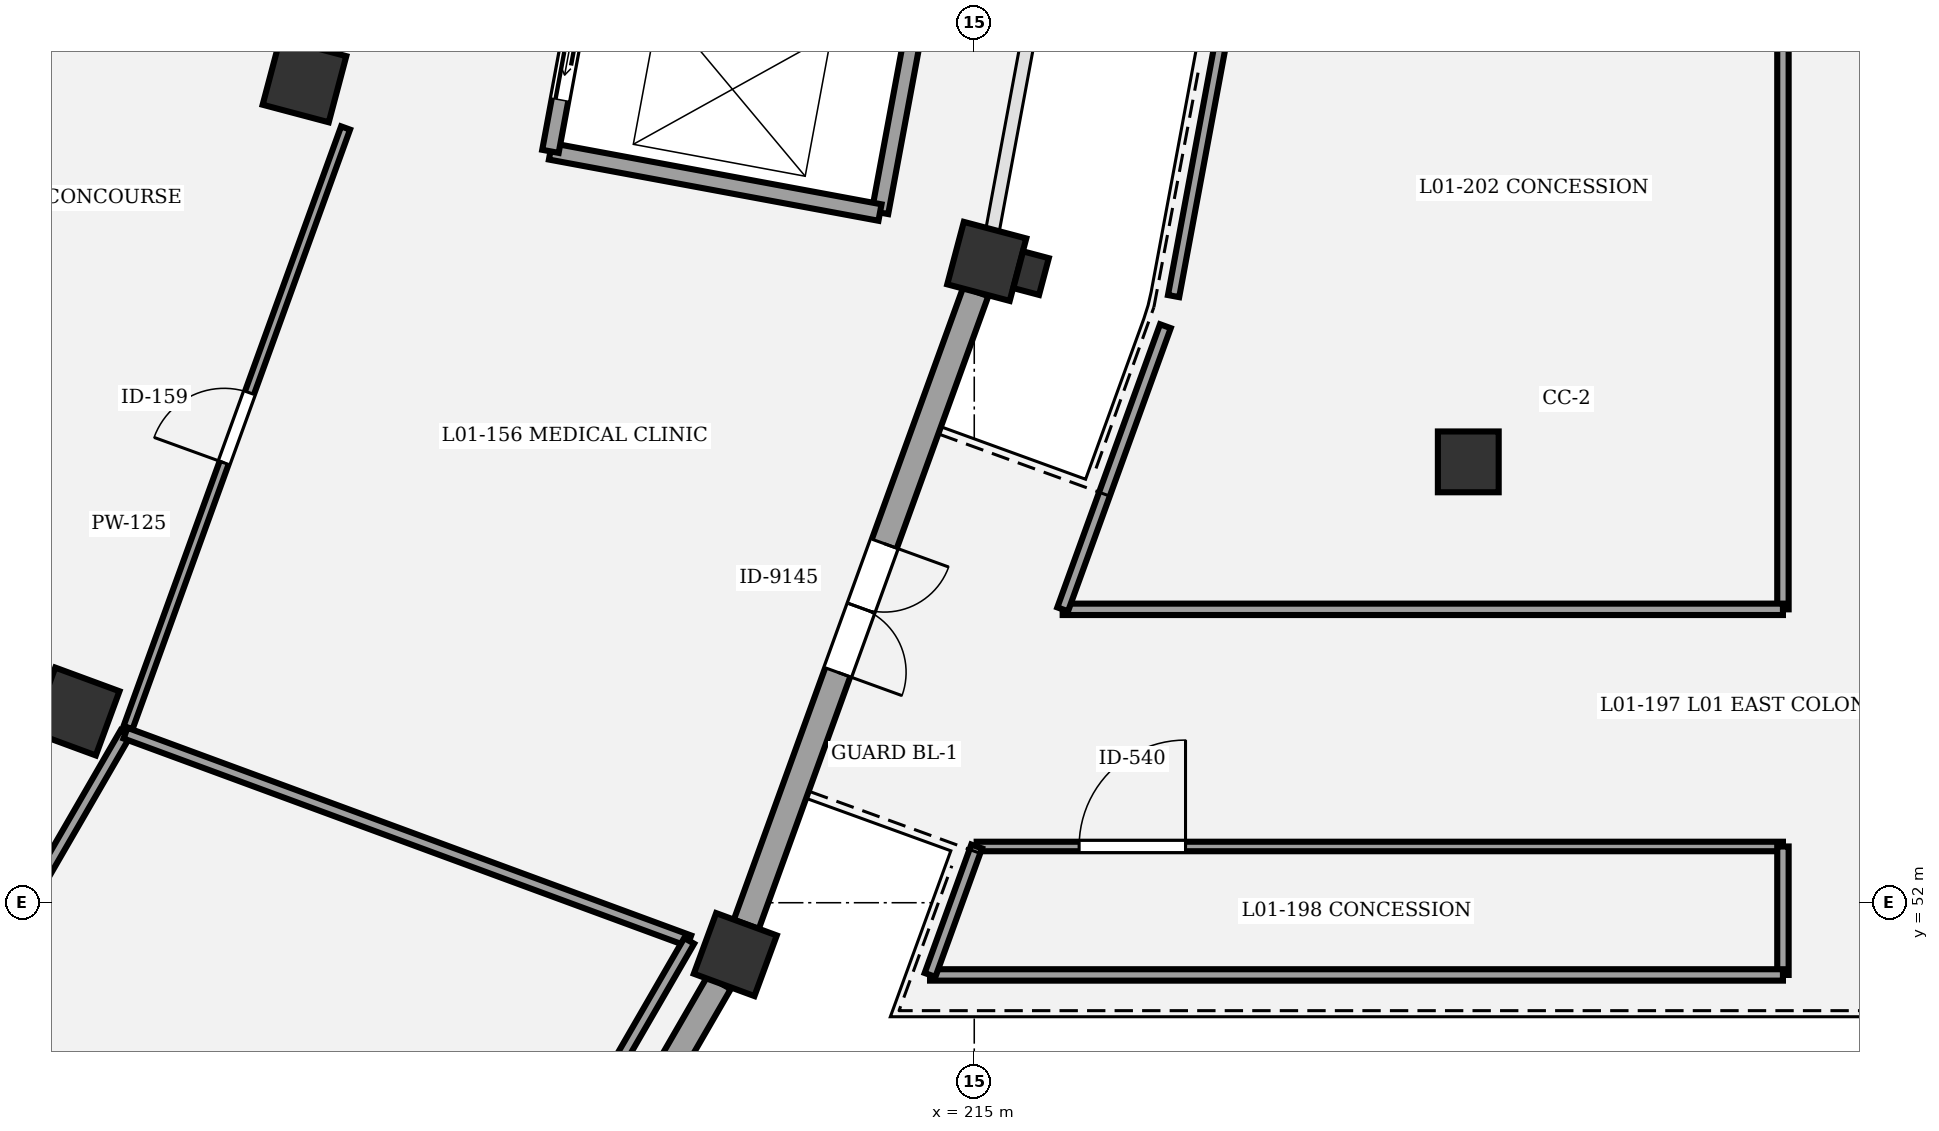
"""IFC4 building model, lengths in metres.
Left out: names, types, materials, properties, quantities, classifications, styles, units other than length and angle.
Written with IfcOpenShell. Run it as: python <this file> out.ifc"""

import sys

from ifc_helpers import new_model, si_unit, direction, frame, frame_2d, origin, origin_2d, place, context, subcontext, project, spatial, rectangle, circle, extrude, element, fill, save


model = new_model("IFC4")
c1 = context("Model", 3, precision=1e-05, world=origin(), true_north=direction((0.0, 1.0)))
c2 = subcontext(c1, "Body", "Model", "MODEL_VIEW")
j1 = project(units=[si_unit("LENGTHUNIT", "METRE"), si_unit("PLANEANGLEUNIT", "RADIAN")], contexts=[c1])
p1 = place(None, origin())
s1 = spatial("IfcSite", under=j1, at=p1, CompositionType="ELEMENT")
p2 = place(p1, origin())
s2 = spatial("IfcBuilding", under=s1, at=p2, CompositionType="ELEMENT")
p3 = place(p2, frame((0.0, 0.0, 5.4)))
s3 = spatial("IfcBuildingStorey", under=s2, at=p3, CompositionType="ELEMENT", Elevation=5.4)
p4 = place(p3, frame((203.176, 54.516, 0.0), z_axis=(0.0, 0.0, 1.0), x_axis=(0.938372433776, -0.34562577382, 0.0)))
e1 = element("IfcColumn", 1, at=p4, inside=s3, PredefinedType="COLUMN", context=c2, shape_type="SweptSolid", body=[
    extrude(rectangle(XDim=0.9, YDim=0.9, at=origin_2d()), origin(), (0.0, 0.0, 1.0), 4.8),
])
p5 = place(p3, frame((211.856, 51.318, 0.0), z_axis=(0.0, 0.0, 1.0), x_axis=(0.938372433776, -0.34562577382, 0.0)))
e2 = element("IfcColumn", 2, at=p5, inside=s3, PredefinedType="COLUMN", context=c2, shape_type="SweptSolid", body=[
    extrude(rectangle(XDim=0.85, YDim=0.85, at=origin_2d()), origin(), (0.0, 0.0, 1.0), 4.8),
])
p6 = place(p3, frame((206.188, 62.818, 0.0), z_axis=(0.0, 0.0, 1.0), x_axis=(0.966600102017, -0.256289373133, 0.0)))
e3 = element("IfcColumn", 3, at=p6, inside=s3, PredefinedType="COLUMN", context=c2, shape_type="SweptSolid", body=[
    extrude(rectangle(XDim=0.9, YDim=0.9, at=origin_2d()), origin(), (0.0, 0.0, 1.0), 4.8),
])
p7 = place(p3, frame((215.165, 60.438, 0.0), z_axis=(0.0, 0.0, 1.0), x_axis=(0.966600102017, -0.256289373133, 0.0)))
e4 = element("IfcColumn", 4, at=p7, inside=s3, PredefinedType="COLUMN", context=c2, shape_type="SweptSolid", body=[
    extrude(rectangle(XDim=0.85, YDim=0.85, at=origin_2d()), origin(), (0.0, 0.0, 1.0), 4.8),
])
p8 = place(p3, frame((215.748, 60.283, 0.0), z_axis=(0.0, 0.0, 1.0), x_axis=(0.256289373133, 0.966600102017, 0.0)))
e5 = element("IfcColumn", 5, at=p8, inside=s3, PredefinedType="PILASTER", context=c2, shape_type="SweptSolid", body=[
    extrude(rectangle(XDim=0.5, YDim=0.35, at=origin_2d()), origin(), (0.0, 0.0, 1.0), 4.8),
])
p9 = place(p3, frame((221.5, 57.8, 0.0), z_axis=(0.0, 0.0, 1.0), x_axis=(1.0, 0.0, 0.0)))
e6 = element("IfcColumn", 6, at=p9, inside=s3, PredefinedType="COLUMN", context=c2, shape_type="SweptSolid", body=[
    extrude(circle(Radius=0.4, at=origin_2d()), origin(), (0.0, 0.0, 1.0), 4.8),
])
p10 = place(p3, frame((207.454, 43.705, 0.0), z_axis=(0.0, 0.0, 1.0), x_axis=(0.500557937356, 0.865703038778, 0.0)))
e7 = element("IfcWall", 7, at=p10, inside=s3, PredefinedType="STANDARD", context=c2, shape_type="SweptSolid", body=[
    extrude(rectangle(XDim=8.371, YDim=0.35, at=frame_2d((4.186, 0.0))), origin(), (0.0, 0.0, 1.0), 3.57),
])
p11 = place(p10, frame((3.075, 0.0, 0.9)))
e8 = element("IfcOpeningElement", 8, at=p11, cuts=e7, PredefinedType="OPENING", context=c2, shape_type="SweptSolid", body=[
    extrude(rectangle(XDim=2.22, YDim=1.75, at=frame_2d((1.11, 0.875))), frame((0.0, 0.185, 0.0), z_axis=(0.0, -1.0, 0.0), x_axis=(1.0, 0.0, 0.0)), (0.0, 0.0, 1.0), 0.37),
])
p12 = place(p3, frame((215.02, 60.04, 0.0), z_axis=(0.0, 0.0, 1.0), x_axis=(-0.341014666885, -0.940057975324, 0.0)))
e9 = element("IfcWall", 9, at=p12, inside=s3, PredefinedType="STANDARD", context=c2, shape_type="SweptSolid", body=[
    extrude(rectangle(XDim=8.855, YDim=0.35, at=frame_2d((4.428, 0.0))), origin(), (0.0, 0.0, 1.0), 3.57),
])
p13 = place(p12, frame((3.528, 0.0, 0.0)))
e10 = element("IfcOpeningElement", 10, at=p13, cuts=e9, PredefinedType="OPENING", context=c2, shape_type="SweptSolid", body=[
    extrude(rectangle(XDim=1.8, YDim=2.4, at=frame_2d((0.9, 1.2))), frame((0.0, 0.185, 0.0), z_axis=(0.0, -1.0, 0.0), x_axis=(1.0, 0.0, 0.0)), (0.0, 0.0, 1.0), 0.37),
])
p14 = place(p3, frame((215.772, 71.915, 0.0), z_axis=(0.0, 0.0, 1.0), x_axis=(-0.182574755222, -0.983191974517, 0.0)))
e11 = element("IfcWall", 11, at=p14, inside=s3, PredefinedType="SHEAR", context=c2, shape_type="SweptSolid", body=[
    extrude(rectangle(XDim=11.02, YDim=0.22, at=frame_2d((5.51, 0.0))), origin(), (0.0, 0.0, 1.0), 4.55),
])
p15 = place(p3, frame((209.424, 61.885, 0.0), z_axis=(0.0, 0.0, 1.0), x_axis=(0.983189729951, -0.18258684213, 0.0)))
e12 = element("IfcWall", 12, at=p15, inside=s3, PredefinedType="SHEAR", context=c2, shape_type="SweptSolid", body=[
    extrude(rectangle(XDim=4.41, YDim=0.22, at=frame_2d((2.205, 0.0))), origin(), (0.0, 0.0, 1.0), 4.55),
])
p16 = place(p3, frame((211.436, 72.72, 0.0), z_axis=(0.0, 0.0, 1.0), x_axis=(-0.182570778451, -0.983192712979, 0.0)))
e13 = element("IfcWall", 13, at=p16, inside=s3, PredefinedType="SHEAR", context=c2, shape_type="SweptSolid", body=[
    extrude(rectangle(XDim=11.02, YDim=0.22, at=frame_2d((5.51, 0.0))), origin(), (0.0, 0.0, 1.0), 4.55),
])
p17 = place(p16, frame((0.3, 0.0, 0.0)))
e14 = element("IfcOpeningElement", 14, at=p17, cuts=e13, PredefinedType="OPENING", context=c2, shape_type="SweptSolid", body=[
    extrude(rectangle(XDim=1.15, YDim=2.15, at=frame_2d((0.575, 1.075))), frame((0.0, 0.12, 0.0), z_axis=(0.0, -1.0, 0.0), x_axis=(1.0, 0.0, 0.0)), (0.0, 0.0, 1.0), 0.24),
])
p18 = place(p16, frame((9.23, 0.0, 0.0)))
e15 = element("IfcOpeningElement", 15, at=p18, cuts=e13, PredefinedType="OPENING", context=c2, shape_type="SweptSolid", body=[
    extrude(rectangle(XDim=1.1, YDim=2.15, at=frame_2d((0.55, 1.075))), frame((0.0, 0.12, 0.0), z_axis=(0.0, -1.0, 0.0), x_axis=(1.0, 0.0, 0.0)), (0.0, 0.0, 1.0), 0.24),
])
p19 = place(p3, frame((199.641, 46.981, 0.0), z_axis=(0.0, 0.0, 1.0), x_axis=(0.500559280672, 0.865702262059, 0.0)))
e16 = element("IfcWall", 16, at=p19, inside=s3, PredefinedType="PARTITIONING", context=c2, shape_type="SweptSolid", body=[
    extrude(rectangle(XDim=8.375, YDim=0.15, at=frame_2d((4.187, 0.0))), origin(), (0.0, 0.0, 1.0), 3.55),
])
p20 = place(p19, frame((3.737, 0.0, 0.0)))
e17 = element("IfcOpeningElement", 17, at=p20, cuts=e16, PredefinedType="OPENING", context=c2, shape_type="SweptSolid", body=[
    extrude(rectangle(XDim=0.9, YDim=2.2, at=frame_2d((0.45, 1.1))), frame((0.0, 0.085, 0.0), z_axis=(0.0, -1.0, 0.0), x_axis=(1.0, 0.0, 0.0)), (0.0, 0.0, 1.0), 0.17),
])
p21 = place(p3, frame((203.866, 54.304, 0.0), z_axis=(0.0, 0.0, 1.0), x_axis=(0.341044550343, 0.940047134287, 0.0)))
e18 = element("IfcWall", 18, at=p21, inside=s3, PredefinedType="PARTITIONING", context=c2, shape_type="SweptSolid", body=[
    extrude(rectangle(XDim=8.392, YDim=0.125, at=frame_2d((4.196, 0.0))), origin(), (0.0, 0.0, 1.0), 3.55),
])
p22 = place(p21, frame((3.706, 0.0, 0.0)))
e19 = element("IfcOpeningElement", 19, at=p22, cuts=e18, PredefinedType="OPENING", context=c2, shape_type="SweptSolid", body=[
    extrude(rectangle(XDim=0.98, YDim=2.2, at=frame_2d((0.49, 1.1))), frame((0.0, 0.073, 0.0), z_axis=(0.0, -1.0, 0.0), x_axis=(1.0, 0.0, 0.0)), (0.0, 0.0, 1.0), 0.145),
])
p23 = place(p3, frame((215.031, 52.74, 0.0), z_axis=(0.0, 0.0, 1.0), x_axis=(1.0, 0.0, 0.0)))
e20 = element("IfcWall", 20, at=p23, inside=s3, PredefinedType="PARTITIONING", context=c2, shape_type="SweptSolid", body=[
    extrude(rectangle(XDim=10.608, YDim=0.125, at=frame_2d((5.304, 0.0))), origin(), (0.0, 0.0, 1.0), 3.55),
])
p24 = place(p23, frame((1.348, 0.0, 0.0)))
e21 = element("IfcOpeningElement", 21, at=p24, cuts=e20, PredefinedType="OPENING", context=c2, shape_type="SweptSolid", body=[
    extrude(rectangle(XDim=1.4, YDim=2.3, at=frame_2d((0.7, 1.15))), frame((0.0, 0.073, 0.0), z_axis=(0.0, -1.0, 0.0), x_axis=(1.0, 0.0, 0.0)), (0.0, 0.0, 1.0), 0.145),
])
p25 = place(p3, frame((225.64, 74.55, 0.0), z_axis=(0.0, 0.0, 1.0), x_axis=(0.0, -1.0, 0.0)))
e22 = element("IfcWall", 22, at=p25, inside=s3, PredefinedType="PARTITIONING", context=c2, shape_type="SweptSolid", body=[
    extrude(rectangle(XDim=18.69, YDim=0.15, at=frame_2d((9.345, 0.0))), origin(), (0.0, 0.0, 1.0), 3.55),
])
p26 = place(p25, frame((6.281, 0.0, 0.0)))
e23 = element("IfcOpeningElement", 23, at=p26, cuts=e22, PredefinedType="OPENING", context=c2, shape_type="SweptSolid", body=[
    extrude(rectangle(XDim=1.02, YDim=2.1, at=frame_2d((0.51, 1.05))), frame((0.0, 0.085, 0.0), z_axis=(0.0, -1.0, 0.0), x_axis=(1.0, 0.0, 0.0)), (0.0, 0.0, 1.0), 0.17),
])
p27 = place(p3, frame((203.833, 54.231, 0.0), z_axis=(0.0, 0.0, 1.0), x_axis=(0.938352081903, -0.34568102405, 0.0)))
e24 = element("IfcWall", 24, at=p27, inside=s3, PredefinedType="PARTITIONING", context=c2, shape_type="SweptSolid", body=[
    extrude(rectangle(XDim=7.904, YDim=0.15, at=frame_2d((3.952, 0.0))), origin(), (0.0, 0.0, 1.0), 3.55),
])
p28 = place(p3, frame((211.25, 51.499, 0.0), z_axis=(0.0, 0.0, 1.0), x_axis=(-0.500574107164, -0.865693689036, 0.0)))
e25 = element("IfcWall", 25, at=p28, inside=s3, PredefinedType="PARTITIONING", context=c2, shape_type="SweptSolid", body=[
    extrude(rectangle(XDim=9.08, YDim=0.15, at=frame_2d((4.54, 0.0))), origin(), (0.0, 0.0, 1.0), 3.55),
])
p29 = place(p3, frame((225.64, 52.74, 0.0), z_axis=(0.0, 0.0, 1.0), x_axis=(0.0, -1.0, 0.0)))
e26 = element("IfcWall", 26, at=p29, inside=s3, PredefinedType="PARTITIONING", context=c2, shape_type="SweptSolid", body=[
    extrude(rectangle(XDim=1.69, YDim=0.15, at=frame_2d((0.845, 0.0))), origin(), (0.0, 0.0, 1.0), 3.55),
])
p30 = place(p3, frame((225.64, 51.05, 0.0), z_axis=(0.0, 0.0, 1.0), x_axis=(-1.0, 0.0, 0.0)))
e27 = element("IfcWall", 27, at=p30, inside=s3, PredefinedType="PARTITIONING", context=c2, shape_type="SweptSolid", body=[
    extrude(rectangle(XDim=11.221, YDim=0.15, at=frame_2d((5.611, 0.0))), origin(), (0.0, 0.0, 1.0), 3.55),
])
p31 = place(p3, frame((214.418, 51.05, 0.0), z_axis=(0.0, 0.0, 1.0), x_axis=(0.341012375502, 0.940058806541, 0.0)))
e28 = element("IfcWall", 28, at=p31, inside=s3, PredefinedType="PARTITIONING", context=c2, shape_type="SweptSolid", body=[
    extrude(rectangle(XDim=1.798, YDim=0.15, at=frame_2d((0.899, 0.0))), origin(), (0.0, 0.0, 1.0), 3.55),
])
p32 = place(p3, frame((217.623, 59.981, 0.0), z_axis=(0.0, 0.0, 1.0), x_axis=(0.182620957058, 0.983183393901, 0.0)))
e29 = element("IfcWall", 29, at=p32, inside=s3, PredefinedType="PARTITIONING", context=c2, shape_type="SweptSolid", body=[
    extrude(rectangle(XDim=10.901, YDim=0.15, at=frame_2d((5.45, 0.0))), origin(), (0.0, 0.0, 1.0), 3.55),
])
p33 = place(p3, frame((225.64, 55.86, 0.0), z_axis=(0.0, 0.0, 1.0), x_axis=(-1.0, 0.0, 0.0)))
e30 = element("IfcWall", 30, at=p33, inside=s3, PredefinedType="PARTITIONING", context=c2, shape_type="SweptSolid", body=[
    extrude(rectangle(XDim=9.477, YDim=0.15, at=frame_2d((4.738, 0.0))), origin(), (0.0, 0.0, 1.0), 3.55),
])
p34 = place(p3, frame((216.163, 55.86, 0.0), z_axis=(0.0, 0.0, 1.0), x_axis=(0.341035525383, 0.94005040845, 0.0)))
e31 = element("IfcWall", 31, at=p34, inside=s3, PredefinedType="PARTITIONING", context=c2, shape_type="SweptSolid", body=[
    extrude(rectangle(XDim=3.962, YDim=0.15, at=frame_2d((1.981, 0.0))), origin(), (0.0, 0.0, 1.0), 3.55),
])
p35 = place(p13, origin())
e32 = element("IfcDoor", 32, at=p35, inside=s3, OperationType="DOUBLE_DOOR_SINGLE_SWING", PredefinedType="DOOR", context=c2, shape_type="SweptSolid", body=[
    extrude(rectangle(XDim=1.8, YDim=2.4, at=frame_2d((0.9, 1.2))), frame((0.0, 0.025, 0.0), z_axis=(0.0, -1.0, 0.0), x_axis=(1.0, 0.0, 0.0)), (0.0, 0.0, 1.0), 0.05),
])
fill(e10, e32)
p36 = place(p18, origin())
e33 = element("IfcDoor", 33, at=p36, inside=s3, OperationType="DOUBLE_DOOR_SLIDING", PredefinedType="DOOR", context=c2, shape_type="SweptSolid", body=[
    extrude(rectangle(XDim=1.1, YDim=2.15, at=frame_2d((0.55, 1.075))), frame((0.0, 0.025, 0.0), z_axis=(0.0, -1.0, 0.0), x_axis=(1.0, 0.0, 0.0)), (0.0, 0.0, 1.0), 0.05),
])
fill(e15, e33)
p37 = place(p22, origin())
e34 = element("IfcDoor", 34, at=p37, inside=s3, OperationType="SINGLE_SWING_LEFT", PredefinedType="DOOR", context=c2, shape_type="SweptSolid", body=[
    extrude(rectangle(XDim=0.98, YDim=2.2, at=frame_2d((0.49, 1.1))), frame((0.0, 0.025, 0.0), z_axis=(0.0, -1.0, 0.0), x_axis=(1.0, 0.0, 0.0)), (0.0, 0.0, 1.0), 0.05),
])
fill(e19, e34)
p38 = place(p24, origin())
e35 = element("IfcDoor", 35, at=p38, inside=s3, OperationType="SINGLE_SWING_RIGHT", PredefinedType="DOOR", context=c2, shape_type="SweptSolid", body=[
    extrude(rectangle(XDim=1.4, YDim=2.3, at=frame_2d((0.7, 1.15))), frame((0.0, 0.025, 0.0), z_axis=(0.0, -1.0, 0.0), x_axis=(1.0, 0.0, 0.0)), (0.0, 0.0, 1.0), 0.05),
])
fill(e21, e35)
save(model, sys.argv[1])
